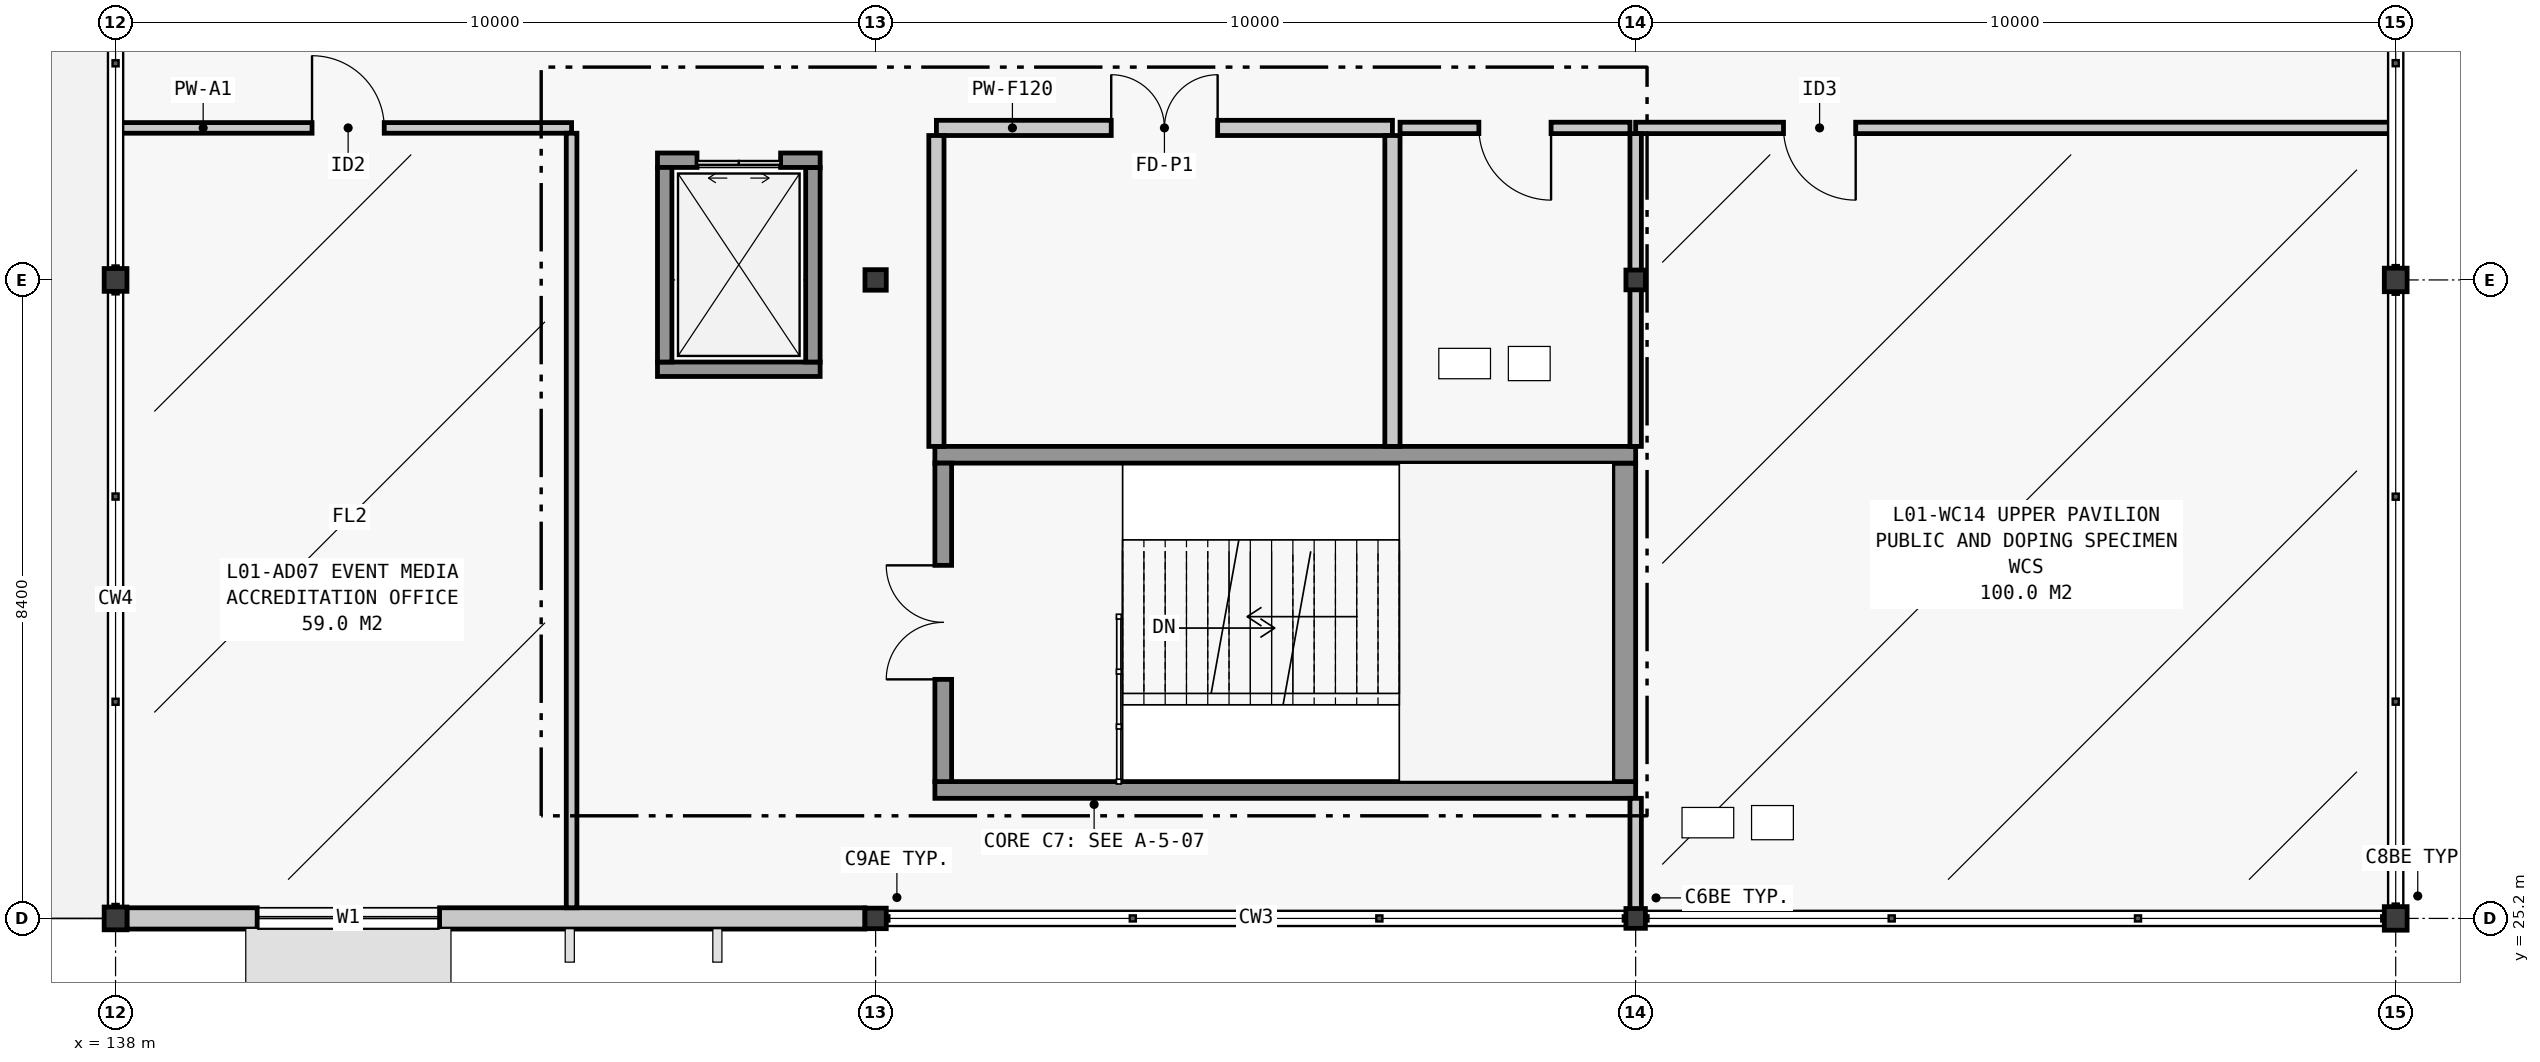
"""IFC4 building model, lengths in metres.
Left out: names, types, materials, properties, quantities, classifications, styles, units other than length and angle.
Written with IfcOpenShell. Run it as: python <this file> out.ifc"""

import sys

from ifc_helpers import new_model, si_unit, direction, frame, frame_2d, origin, origin_2d, place, context, subcontext, project, spatial, rectangle, i_section, extrude, element, fill, save


model = new_model("IFC4")
c1 = context("Model", 3, precision=1e-05, world=origin(), true_north=direction((0.0, 1.0)))
c2 = subcontext(c1, "Body", "Model", "MODEL_VIEW")
j1 = project(units=[si_unit("LENGTHUNIT", "METRE"), si_unit("PLANEANGLEUNIT", "RADIAN")], contexts=[c1])
p1 = place(None, origin())
s1 = spatial("IfcSite", under=j1, at=p1, CompositionType="ELEMENT")
p2 = place(p1, origin())
s2 = spatial("IfcBuilding", under=s1, at=p2, CompositionType="ELEMENT")
p3 = place(p2, frame((0.0, 0.0, 4.8)))
s3 = spatial("IfcBuildingStorey", under=s2, at=p3, CompositionType="ELEMENT", Elevation=4.8)
for number, where, z_axis, x_axis in (
    (1, (138.0, 25.2, 0.0), (0.0, 0.0, 1.0), (1.0, 0.0, 0.0)),
    (2, (138.0, 33.6, 0.0), (0.0, 0.0, 1.0), (1.0, 0.0, 0.0)),
):
    element("IfcColumn", number, at=place(p3, frame(where, z_axis=z_axis, x_axis=x_axis)), inside=s3, PredefinedType="COLUMN", context=c2, shape_type="SweptSolid", body=[
        extrude(i_section(OverallWidth=0.3, OverallDepth=0.3, WebThickness=0.011, FlangeThickness=0.019, FilletRadius=0.027, at=origin_2d()), origin(), (0.0, 0.0, 1.0), 4.2),
    ])
for number, where, z_axis, x_axis in (
    (3, (148.0, 25.2, 0.0), (0.0, 0.0, 1.0), (1.0, 0.0, 0.0)),
    (4, (148.0, 33.6, 0.0), (0.0, 0.0, 1.0), (1.0, 0.0, 0.0)),
):
    element("IfcColumn", number, at=place(p3, frame(where, z_axis=z_axis, x_axis=x_axis)), inside=s3, PredefinedType="COLUMN", context=c2, shape_type="SweptSolid", body=[
        extrude(i_section(OverallWidth=0.28, OverallDepth=0.27, WebThickness=0.008, FlangeThickness=0.013, FilletRadius=0.024, at=origin_2d()), origin(), (0.0, 0.0, 1.0), 4.2),
    ])
for number, where, z_axis, x_axis in (
    (5, (158.0, 25.2, 0.0), (0.0, 0.0, 1.0), (1.0, 0.0, 0.0)),
    (6, (158.0, 33.6, 0.0), (0.0, 0.0, 1.0), (1.0, 0.0, 0.0)),
):
    element("IfcColumn", number, at=place(p3, frame(where, z_axis=z_axis, x_axis=x_axis)), inside=s3, PredefinedType="COLUMN", context=c2, shape_type="SweptSolid", body=[
        extrude(i_section(OverallWidth=0.256, OverallDepth=0.26, WebThickness=0.01, FlangeThickness=0.017, FilletRadius=0.013, at=origin_2d()), origin(), (0.0, 0.0, 1.0), 4.2),
    ])
for number, where, z_axis, x_axis in (
    (7, (168.0, 25.2, 0.0), (0.0, 0.0, 1.0), (1.0, 0.0, 0.0)),
    (8, (168.0, 33.6, 0.0), (0.0, 0.0, 1.0), (1.0, 0.0, 0.0)),
):
    element("IfcColumn", number, at=place(p3, frame(where, z_axis=z_axis, x_axis=x_axis)), inside=s3, PredefinedType="COLUMN", context=c2, shape_type="SweptSolid", body=[
        extrude(i_section(OverallWidth=0.3, OverallDepth=0.31, WebThickness=0.009, FlangeThickness=0.015, FilletRadius=0.027, at=origin_2d()), origin(), (0.0, 0.0, 1.0), 4.2),
    ])
p4 = place(p3, frame((138.15, 25.2, 0.0), z_axis=(0.0, 0.0, 1.0), x_axis=(1.0, 0.0, 0.0)))
e9 = element("IfcWall", 9, at=p4, inside=s3, PredefinedType="STANDARD", context=c2, shape_type="SweptSolid", body=[
    extrude(rectangle(XDim=9.71, YDim=0.28, at=frame_2d((4.855, 0.0))), origin(), (0.0, 0.0, 1.0), 3.676),
])
p5 = place(p4, frame((1.713, 0.0, 0.9)))
e10 = element("IfcOpeningElement", 10, at=p5, cuts=e9, PredefinedType="OPENING", context=c2, shape_type="SweptSolid", body=[
    extrude(rectangle(XDim=2.4, YDim=1.8, at=frame_2d((1.2, 0.9))), frame((0.0, 0.155, 0.0), z_axis=(0.0, -1.0, 0.0), x_axis=(1.0, 0.0, 0.0)), (0.0, 0.0, 1.0), 0.31),
])
p6 = place(p3, frame((148.78, 26.89, 0.0), z_axis=(0.0, 0.0, 1.0), x_axis=(1.0, 0.0, 0.0)))
e11 = element("IfcWall", 11, at=p6, inside=s3, PredefinedType="SOLIDWALL", context=c2, shape_type="SweptSolid", body=[
    extrude(rectangle(XDim=9.22, YDim=0.22, at=frame_2d((4.61, 0.0))), origin(), (0.0, 0.0, 1.0), 3.94),
])
p7 = place(p3, frame((157.85, 27.0, 0.0), z_axis=(0.0, 0.0, 1.0), x_axis=(0.0, 1.0, 0.0)))
e12 = element("IfcWall", 12, at=p7, inside=s3, PredefinedType="SHEAR", context=c2, shape_type="SweptSolid", body=[
    extrude(rectangle(XDim=4.19, YDim=0.3, at=frame_2d((2.095, 0.0))), origin(), (0.0, 0.0, 1.0), 3.94),
])
p8 = place(p3, frame((158.0, 31.3, 0.0), z_axis=(0.0, 0.0, 1.0), x_axis=(-1.0, 0.0, 0.0)))
e13 = element("IfcWall", 13, at=p8, inside=s3, PredefinedType="SOLIDWALL", context=c2, shape_type="SweptSolid", body=[
    extrude(rectangle(XDim=9.22, YDim=0.22, at=frame_2d((4.61, 0.0))), origin(), (0.0, 0.0, 1.0), 3.94),
])
p9 = place(p3, frame((148.89, 31.19, 0.0), z_axis=(0.0, 0.0, 1.0), x_axis=(0.0, -1.0, 0.0)))
e14 = element("IfcWall", 14, at=p9, inside=s3, PredefinedType="SOLIDWALL", context=c2, shape_type="SweptSolid", body=[
    extrude(rectangle(XDim=4.19, YDim=0.22, at=frame_2d((2.095, 0.0))), origin(), (0.0, 0.0, 1.0), 3.94),
])
p10 = place(p9, frame((1.345, 0.0, 0.0)))
e15 = element("IfcOpeningElement", 15, at=p10, cuts=e14, PredefinedType="OPENING", context=c2, shape_type="SweptSolid", body=[
    extrude(rectangle(XDim=1.5, YDim=2.2, at=frame_2d((0.75, 1.1))), frame((0.0, 0.125, 0.0), z_axis=(0.0, -1.0, 0.0), x_axis=(1.0, 0.0, 0.0)), (0.0, 0.0, 1.0), 0.25),
])
p11 = place(p3, frame((145.13, 32.425, 0.0), z_axis=(0.0, 0.0, 1.0), x_axis=(1.0, 0.0, 0.0)))
e16 = element("IfcWall", 16, at=p11, inside=s3, PredefinedType="SOLIDWALL", context=c2, shape_type="SweptSolid", body=[
    extrude(rectangle(XDim=2.14, YDim=0.19, at=frame_2d((1.07, 0.0))), origin(), (0.0, 0.0, 1.0), 3.94),
])
p12 = place(p3, frame((147.175, 32.52, 0.0), z_axis=(0.0, 0.0, 1.0), x_axis=(0.0, 1.0, 0.0)))
e17 = element("IfcWall", 17, at=p12, inside=s3, PredefinedType="SOLIDWALL", context=c2, shape_type="SweptSolid", body=[
    extrude(rectangle(XDim=2.56, YDim=0.19, at=frame_2d((1.28, 0.0))), origin(), (0.0, 0.0, 1.0), 3.94),
])
p13 = place(p3, frame((147.27, 35.175, 0.0), z_axis=(0.0, 0.0, 1.0), x_axis=(-1.0, 0.0, 0.0)))
e18 = element("IfcWall", 18, at=p13, inside=s3, PredefinedType="SOLIDWALL", context=c2, shape_type="SweptSolid", body=[
    extrude(rectangle(XDim=2.14, YDim=0.19, at=frame_2d((1.07, 0.0))), origin(), (0.0, 0.0, 1.0), 3.94),
])
p14 = place(p13, frame((0.52, 0.0, 0.0)))
e19 = element("IfcOpeningElement", 19, at=p14, cuts=e18, PredefinedType="OPENING", context=c2, shape_type="SweptSolid", body=[
    extrude(rectangle(XDim=1.1, YDim=2.2, at=frame_2d((0.55, 1.1))), frame((0.0, 0.11, 0.0), z_axis=(0.0, -1.0, 0.0), x_axis=(1.0, 0.0, 0.0)), (0.0, 0.0, 1.0), 0.22),
])
p15 = place(p3, frame((145.225, 35.08, 0.0), z_axis=(0.0, 0.0, 1.0), x_axis=(0.0, -1.0, 0.0)))
e20 = element("IfcWall", 20, at=p15, inside=s3, PredefinedType="SOLIDWALL", context=c2, shape_type="SweptSolid", body=[
    extrude(rectangle(XDim=2.56, YDim=0.19, at=frame_2d((1.28, 0.0))), origin(), (0.0, 0.0, 1.0), 3.94),
])
p16 = place(p3, frame((138.02, 35.6, 0.0), z_axis=(0.0, 0.0, 1.0), x_axis=(1.0, 0.0, 0.0)))
e21 = element("IfcWall", 21, at=p16, inside=s3, PredefinedType="PARTITIONING", context=c2, shape_type="SweptSolid", body=[
    extrude(rectangle(XDim=5.98, YDim=0.14, at=frame_2d((2.99, 0.0))), origin(), (0.0, 0.0, 1.0), 3.94),
])
p17 = place(p16, frame((2.565, 0.0, 0.0)))
e22 = element("IfcOpeningElement", 22, at=p17, cuts=e21, PredefinedType="OPENING", context=c2, shape_type="SweptSolid", body=[
    extrude(rectangle(XDim=0.95, YDim=2.15, at=frame_2d((0.475, 1.075))), frame((0.0, 0.085, 0.0), z_axis=(0.0, -1.0, 0.0), x_axis=(1.0, 0.0, 0.0)), (0.0, 0.0, 1.0), 0.17),
])
p18 = place(p3, frame((144.0, 25.34, 0.0), z_axis=(0.0, 0.0, 1.0), x_axis=(0.0, 1.0, 0.0)))
e23 = element("IfcWall", 23, at=p18, inside=s3, PredefinedType="PARTITIONING", context=c2, shape_type="SweptSolid", body=[
    extrude(rectangle(XDim=10.19, YDim=0.14, at=frame_2d((5.095, 0.0))), origin(), (0.0, 0.0, 1.0), 3.94),
])
p19 = place(p3, frame((158.0, 35.6, 0.0), z_axis=(0.0, 0.0, 1.0), x_axis=(1.0, 0.0, 0.0)))
e24 = element("IfcWall", 24, at=p19, inside=s3, PredefinedType="PLUMBINGWALL", context=c2, shape_type="SweptSolid", body=[
    extrude(rectangle(XDim=9.98, YDim=0.15, at=frame_2d((4.99, 0.0))), origin(), (0.0, 0.0, 1.0), 3.94),
])
p20 = place(p19, frame((1.945, 0.0, 0.0)))
e25 = element("IfcOpeningElement", 25, at=p20, cuts=e24, PredefinedType="OPENING", context=c2, shape_type="SweptSolid", body=[
    extrude(rectangle(XDim=0.95, YDim=2.1, at=frame_2d((0.475, 1.05))), frame((0.0, 0.09, 0.0), z_axis=(0.0, -1.0, 0.0), x_axis=(1.0, 0.0, 0.0)), (0.0, 0.0, 1.0), 0.18),
])
p21 = place(p3, frame((158.0, 25.22, 0.0), z_axis=(0.0, 0.0, 1.0), x_axis=(0.0, 1.0, 0.0)))
e26 = element("IfcWall", 26, at=p21, inside=s3, PredefinedType="PLUMBINGWALL", context=c2, shape_type="SweptSolid", body=[
    extrude(rectangle(XDim=1.56, YDim=0.15, at=frame_2d((0.78, 0.0))), origin(), (0.0, 0.0, 1.0), 3.436),
])
p22 = place(p3, frame((158.0, 31.41, 0.0), z_axis=(0.0, 0.0, 1.0), x_axis=(0.0, 1.0, 0.0)))
e27 = element("IfcWall", 27, at=p22, inside=s3, PredefinedType="PLUMBINGWALL", context=c2, shape_type="SweptSolid", body=[
    extrude(rectangle(XDim=4.115, YDim=0.15, at=frame_2d((2.058, 0.0))), origin(), (0.0, 0.0, 1.0), 3.436),
])
p23 = place(p3, frame((148.8, 35.6, 0.0), z_axis=(0.0, 0.0, 1.0), x_axis=(1.0, 0.0, 0.0)))
e28 = element("IfcWall", 28, at=p23, inside=s3, PredefinedType="PARTITIONING", context=c2, shape_type="SweptSolid", body=[
    extrude(rectangle(XDim=6.0, YDim=0.2, at=frame_2d((3.0, 0.0))), origin(), (0.0, 0.0, 1.0), 3.94),
])
p24 = place(p23, frame((2.3, 0.0, 0.0)))
e29 = element("IfcOpeningElement", 29, at=p24, cuts=e28, PredefinedType="OPENING", context=c2, shape_type="SweptSolid", body=[
    extrude(rectangle(XDim=1.4, YDim=2.2, at=frame_2d((0.7, 1.1))), frame((0.0, 0.115, 0.0), z_axis=(0.0, -1.0, 0.0), x_axis=(1.0, 0.0, 0.0)), (0.0, 0.0, 1.0), 0.23),
])
p25 = place(p3, frame((148.8, 31.41, 0.0), z_axis=(0.0, 0.0, 1.0), x_axis=(0.0, 1.0, 0.0)))
e30 = element("IfcWall", 30, at=p25, inside=s3, PredefinedType="PARTITIONING", context=c2, shape_type="SweptSolid", body=[
    extrude(rectangle(XDim=4.09, YDim=0.2, at=frame_2d((2.045, 0.0))), origin(), (0.0, 0.0, 1.0), 3.94),
])
p26 = place(p3, frame((154.8, 31.41, 0.0), z_axis=(0.0, 0.0, 1.0), x_axis=(0.0, 1.0, 0.0)))
e31 = element("IfcWall", 31, at=p26, inside=s3, PredefinedType="PARTITIONING", context=c2, shape_type="SweptSolid", body=[
    extrude(rectangle(XDim=4.09, YDim=0.2, at=frame_2d((2.045, 0.0))), origin(), (0.0, 0.0, 1.0), 3.646),
])
p27 = place(p3, frame((154.9, 35.6, 0.0), z_axis=(0.0, 0.0, 1.0), x_axis=(1.0, 0.0, 0.0)))
e32 = element("IfcWall", 32, at=p27, inside=s3, PredefinedType="PLUMBINGWALL", context=c2, shape_type="SweptSolid", body=[
    extrude(rectangle(XDim=3.025, YDim=0.15, at=frame_2d((1.513, 0.0))), origin(), (0.0, 0.0, 1.0), 3.94),
])
p28 = place(p27, frame((1.037, 0.0, 0.0)))
e33 = element("IfcOpeningElement", 33, at=p28, cuts=e32, PredefinedType="OPENING", context=c2, shape_type="SweptSolid", body=[
    extrude(rectangle(XDim=0.95, YDim=2.1, at=frame_2d((0.475, 1.05))), frame((0.0, 0.09, 0.0), z_axis=(0.0, -1.0, 0.0), x_axis=(1.0, 0.0, 0.0)), (0.0, 0.0, 1.0), 0.18),
])
p29 = place(p5, origin())
e34 = element("IfcWindow", 34, at=p29, inside=s3, PartitioningType="SINGLE_PANEL", PredefinedType="WINDOW", context=c2, shape_type="SweptSolid", body=[
    extrude(rectangle(XDim=2.4, YDim=1.8, at=frame_2d((1.2, 0.9))), frame((0.0, 0.03, 0.0), z_axis=(0.0, -1.0, 0.0), x_axis=(1.0, 0.0, 0.0)), (0.0, 0.0, 1.0), 0.06),
])
fill(e10, e34)
p30 = place(p10, frame((1.5, 0.0, 0.0), z_axis=(0.0, 0.0, 1.0), x_axis=(-1.0, 0.0, 0.0)))
e35 = element("IfcDoor", 35, at=p30, inside=s3, OperationType="DOUBLE_DOOR_SINGLE_SWING", PredefinedType="DOOR", context=c2, shape_type="SweptSolid", body=[
    extrude(rectangle(XDim=1.5, YDim=2.2, at=frame_2d((0.75, 1.1))), frame((0.0, 0.025, 0.0), z_axis=(0.0, -1.0, 0.0), x_axis=(1.0, 0.0, 0.0)), (0.0, 0.0, 1.0), 0.05),
])
fill(e15, e35)
p31 = place(p14, origin())
e36 = element("IfcDoor", 36, at=p31, inside=s3, OperationType="DOUBLE_DOOR_SLIDING", PredefinedType="DOOR", context=c2, shape_type="SweptSolid", body=[
    extrude(rectangle(XDim=1.1, YDim=2.2, at=frame_2d((0.55, 1.1))), frame((0.0, 0.025, 0.0), z_axis=(0.0, -1.0, 0.0), x_axis=(1.0, 0.0, 0.0)), (0.0, 0.0, 1.0), 0.05),
])
fill(e19, e36)
p32 = place(p17, origin())
e37 = element("IfcDoor", 37, at=p32, inside=s3, OperationType="SINGLE_SWING_LEFT", PredefinedType="DOOR", context=c2, shape_type="SweptSolid", body=[
    extrude(rectangle(XDim=0.95, YDim=2.15, at=frame_2d((0.475, 1.075))), frame((0.0, 0.025, 0.0), z_axis=(0.0, -1.0, 0.0), x_axis=(1.0, 0.0, 0.0)), (0.0, 0.0, 1.0), 0.05),
])
fill(e22, e37)
p33 = place(p20, frame((0.95, 0.0, 0.0), z_axis=(0.0, 0.0, 1.0), x_axis=(-1.0, 0.0, 0.0)))
e38 = element("IfcDoor", 38, at=p33, inside=s3, OperationType="SINGLE_SWING_RIGHT", PredefinedType="DOOR", context=c2, shape_type="SweptSolid", body=[
    extrude(rectangle(XDim=0.95, YDim=2.1, at=frame_2d((0.475, 1.05))), frame((0.0, 0.025, 0.0), z_axis=(0.0, -1.0, 0.0), x_axis=(1.0, 0.0, 0.0)), (0.0, 0.0, 1.0), 0.05),
])
fill(e25, e38)
p34 = place(p24, origin())
e39 = element("IfcDoor", 39, at=p34, inside=s3, OperationType="DOUBLE_DOOR_SINGLE_SWING", PredefinedType="DOOR", context=c2, shape_type="SweptSolid", body=[
    extrude(rectangle(XDim=1.4, YDim=2.2, at=frame_2d((0.7, 1.1))), frame((0.0, 0.025, 0.0), z_axis=(0.0, -1.0, 0.0), x_axis=(1.0, 0.0, 0.0)), (0.0, 0.0, 1.0), 0.05),
])
fill(e29, e39)
p35 = place(p28, frame((0.95, 0.0, 0.0), z_axis=(0.0, 0.0, 1.0), x_axis=(-1.0, 0.0, 0.0)))
e40 = element("IfcDoor", 40, at=p35, inside=s3, OperationType="SINGLE_SWING_RIGHT", PredefinedType="DOOR", context=c2, shape_type="SweptSolid", body=[
    extrude(rectangle(XDim=0.95, YDim=2.1, at=frame_2d((0.475, 1.05))), frame((0.0, 0.025, 0.0), z_axis=(0.0, -1.0, 0.0), x_axis=(1.0, 0.0, 0.0)), (0.0, 0.0, 1.0), 0.05),
])
fill(e33, e40)
save(model, sys.argv[1])
